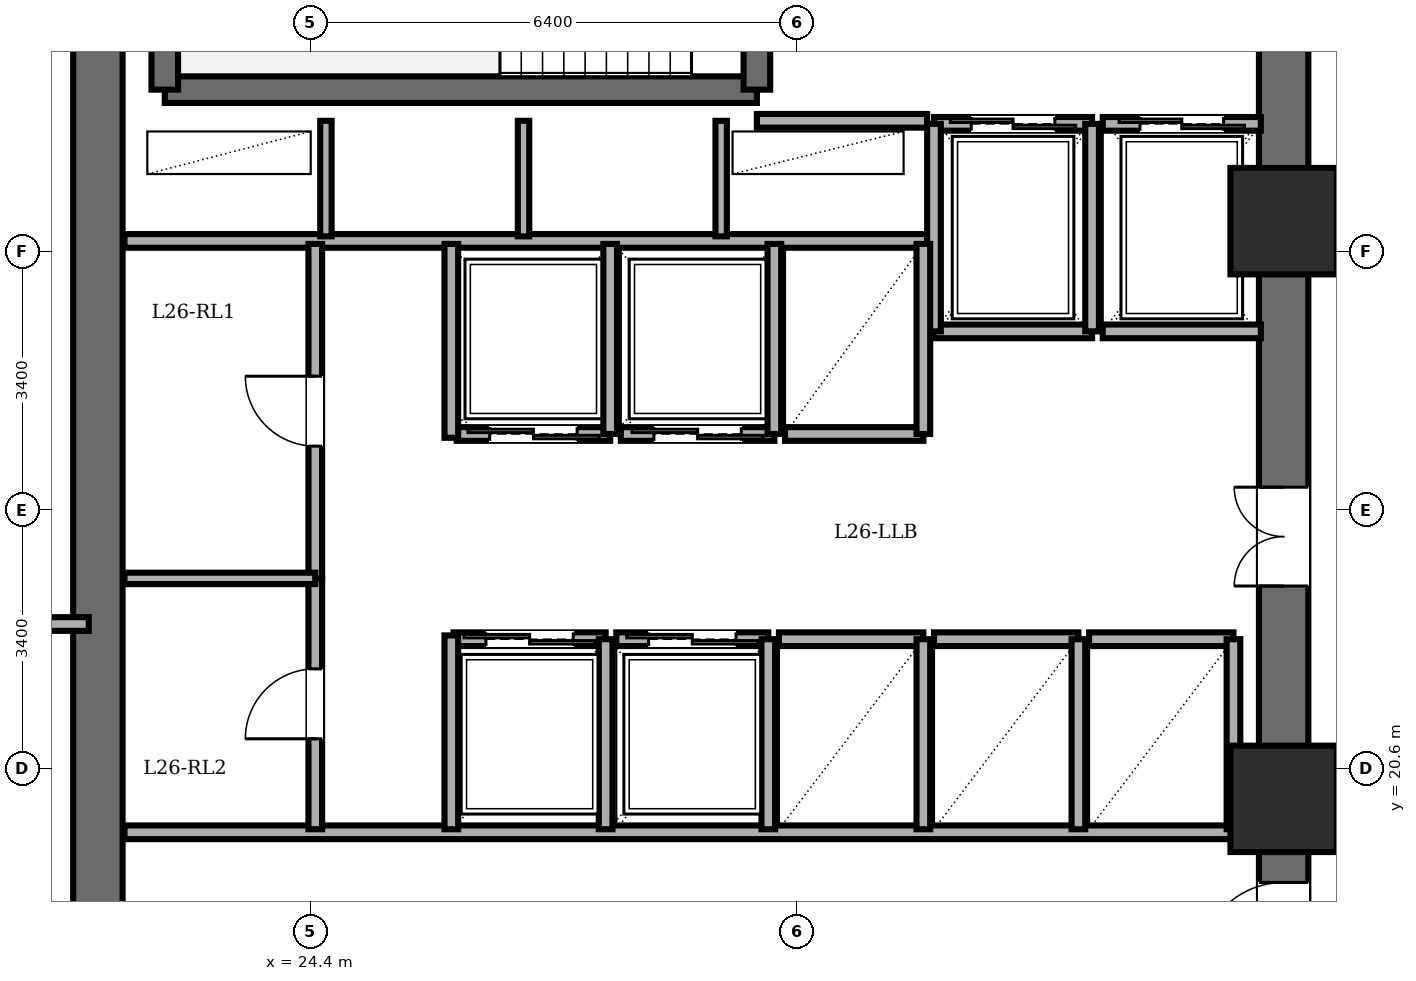
"""IFC4 building model, lengths in metres.
Left out: names, types, materials, properties, quantities, classifications, styles, units other than length and angle.
Written with IfcOpenShell. Run it as: python <this file> out.ifc"""

import sys

from ifc_helpers import new_model, si_unit, direction, frame, frame_2d, origin, origin_2d, place, context, subcontext, project, spatial, rectangle, extrude, element, fill, save


model = new_model("IFC4")
c1 = context("Model", 3, precision=1e-05, world=origin(), true_north=direction((0.0, 1.0)))
c2 = subcontext(c1, "Body", "Model", "MODEL_VIEW")
j1 = project(units=[si_unit("LENGTHUNIT", "METRE"), si_unit("PLANEANGLEUNIT", "RADIAN")], contexts=[c1])
p1 = place(None, origin())
s1 = spatial("IfcSite", under=j1, at=p1, CompositionType="ELEMENT")
p2 = place(p1, origin())
s2 = spatial("IfcBuilding", under=s1, at=p2, CompositionType="ELEMENT")
p3 = place(p2, frame((0.0, 0.0, 100.7)))
s3 = spatial("IfcBuildingStorey", under=s2, at=p3, CompositionType="ELEMENT", Elevation=100.7)
for number, where, z_axis, x_axis in (
    (1, (37.2, 20.2, 0.0), (0.0, 0.0, 1.0), (1.0, 0.0, 0.0)),
    (2, (37.2, 27.8, 0.0), (0.0, 0.0, 1.0), (1.0, 0.0, 0.0)),
):
    element("IfcColumn", number, at=place(p3, frame(where, z_axis=z_axis, x_axis=x_axis)), inside=s3, PredefinedType="COLUMN", context=c2, shape_type="SweptSolid", body=[
        extrude(rectangle(XDim=1.4, YDim=1.4, at=origin_2d()), origin(), (0.0, 0.0, 1.0), 3.6),
    ])
p4 = place(p3, frame((21.6, 14.4, 0.0), z_axis=(0.0, 0.0, 1.0), x_axis=(0.0, 1.0, 0.0)))
e3 = element("IfcWall", 3, at=p4, inside=s3, PredefinedType="SHEAR", context=c2, shape_type="SweptSolid", body=[
    extrude(rectangle(XDim=19.2, YDim=0.65, at=frame_2d((9.6, 0.0))), origin(), (0.0, 0.0, 1.0), 3.4),
])
p5 = place(p3, frame((37.2, 14.4, 0.0), z_axis=(0.0, 0.0, 1.0), x_axis=(0.0, 1.0, 0.0)))
e4 = element("IfcWall", 4, at=p5, inside=s3, PredefinedType="SHEAR", context=c2, shape_type="SweptSolid", body=[
    extrude(rectangle(XDim=19.2, YDim=0.65, at=frame_2d((9.6, 0.0))), origin(), (0.0, 0.0, 1.0), 3.4),
])
p6 = place(p5, frame((15.8, 0.0, 0.0)))
e5 = element("IfcOpeningElement", 5, at=p6, cuts=e4, PredefinedType="OPENING", context=c2, shape_type="SweptSolid", body=[
    extrude(rectangle(XDim=1.15, YDim=2.15, at=frame_2d((0.575, 1.075))), frame((0.0, 0.335, 0.0), z_axis=(0.0, -1.0, 0.0), x_axis=(1.0, 0.0, 0.0)), (0.0, 0.0, 1.0), 0.67),
])
p7 = place(p5, frame((3.6, 0.0, 0.0)))
e6 = element("IfcOpeningElement", 6, at=p7, cuts=e4, PredefinedType="OPENING", context=c2, shape_type="SweptSolid", body=[
    extrude(rectangle(XDim=1.1, YDim=2.15, at=frame_2d((0.55, 1.075))), frame((0.0, 0.335, 0.0), z_axis=(0.0, -1.0, 0.0), x_axis=(1.0, 0.0, 0.0)), (0.0, 0.0, 1.0), 0.67),
])
p8 = place(p5, frame((8.6, 0.0, 0.0)))
e7 = element("IfcOpeningElement", 7, at=p8, cuts=e4, PredefinedType="OPENING", context=c2, shape_type="SweptSolid", body=[
    extrude(rectangle(XDim=1.3, YDim=2.2, at=frame_2d((0.65, 1.1))), frame((0.0, 0.335, 0.0), z_axis=(0.0, -1.0, 0.0), x_axis=(1.0, 0.0, 0.0)), (0.0, 0.0, 1.0), 0.67),
])
p9 = place(p3, frame((22.48, 29.53, 0.0), z_axis=(0.0, 0.0, 1.0), x_axis=(1.0, 0.0, 0.0)))
e8 = element("IfcWall", 8, at=p9, inside=s3, PredefinedType="SOLIDWALL", context=c2, shape_type="SweptSolid", body=[
    extrude(rectangle(XDim=7.79, YDim=0.35, at=frame_2d((3.895, 0.0))), origin(), (0.0, 0.0, 1.0), 3.4),
])
p10 = place(p3, frame((22.48, 29.53, 0.0), z_axis=(0.0, 0.0, 1.0), x_axis=(0.0, 1.0, 0.0)))
e9 = element("IfcWall", 9, at=p10, inside=s3, PredefinedType="SOLIDWALL", context=c2, shape_type="SweptSolid", body=[
    extrude(rectangle(XDim=3.58, YDim=0.35, at=frame_2d((1.79, 0.0))), origin(), (0.0, 0.0, 1.0), 3.4),
])
p11 = place(p3, frame((30.27, 29.53, 0.0), z_axis=(0.0, 0.0, 1.0), x_axis=(0.0, 1.0, 0.0)))
e10 = element("IfcWall", 10, at=p11, inside=s3, PredefinedType="SOLIDWALL", context=c2, shape_type="SweptSolid", body=[
    extrude(rectangle(XDim=3.58, YDim=0.35, at=frame_2d((1.79, 0.0))), origin(), (0.0, 0.0, 1.0), 3.4),
])
p12 = place(p11, frame((1.25, 0.0, 0.0)))
e11 = element("IfcOpeningElement", 11, at=p12, cuts=e10, PredefinedType="OPENING", context=c2, shape_type="SweptSolid", body=[
    extrude(rectangle(XDim=1.1, YDim=2.15, at=frame_2d((0.55, 1.075))), frame((0.0, 0.185, 0.0), z_axis=(0.0, -1.0, 0.0), x_axis=(1.0, 0.0, 0.0)), (0.0, 0.0, 1.0), 0.37),
])
p13 = place(p3, frame((30.27, 29.12, 0.0), z_axis=(0.0, 0.0, 1.0), x_axis=(1.0, 0.0, 0.0)))
e12 = element("IfcWall", 12, at=p13, inside=s3, PredefinedType="PARTITIONING", context=c2, shape_type="SweptSolid", body=[
    extrude(rectangle(XDim=2.24, YDim=0.18, at=frame_2d((1.12, 0.0))), origin(), (0.0, 0.0, 1.0), 3.4),
])
p14 = place(p3, frame((21.95, 27.54, 0.0), z_axis=(0.0, 0.0, 1.0), x_axis=(1.0, 0.0, 0.0)))
e13 = element("IfcWall", 13, at=p14, inside=s3, PredefinedType="PARTITIONING", context=c2, shape_type="SweptSolid", body=[
    extrude(rectangle(XDim=10.56, YDim=0.18, at=frame_2d((5.28, 0.0))), origin(), (0.0, 0.0, 1.0), 3.4),
])
for number, where, z_axis, x_axis in (
    (14, (24.6, 27.6, 0.0), (0.0, 0.0, 1.0), (0.0, 1.0, 0.0)),
    (15, (27.2, 27.6, 0.0), (0.0, 0.0, 1.0), (0.0, 1.0, 0.0)),
    (16, (29.8, 27.6, 0.0), (0.0, 0.0, 1.0), (0.0, 1.0, 0.0)),
):
    element("IfcWall", number, at=place(p3, frame(where, z_axis=z_axis, x_axis=x_axis)), inside=s3, PredefinedType="PARTITIONING", context=c2, shape_type="SweptSolid", body=[
        extrude(rectangle(XDim=1.52, YDim=0.15, at=frame_2d((0.76, 0.0))), origin(), (0.0, 0.0, 1.0), 3.4),
    ])
p15 = place(p3, frame((21.95, 19.76, 0.0), z_axis=(0.0, 0.0, 1.0), x_axis=(1.0, 0.0, 0.0)))
e17 = element("IfcWall", 17, at=p15, inside=s3, PredefinedType="PARTITIONING", context=c2, shape_type="SweptSolid", body=[
    extrude(rectangle(XDim=14.87, YDim=0.18, at=frame_2d((7.435, 0.0))), origin(), (0.0, 0.0, 1.0), 3.4),
])
p16 = place(p3, frame((32.6, 29.08, 0.0), z_axis=(0.0, 0.0, 1.0), x_axis=(1.0, 0.0, 0.0)))
e18 = element("IfcWall", 18, at=p16, inside=s3, PredefinedType="PARTITIONING", context=c2, shape_type="SweptSolid", body=[
    extrude(rectangle(XDim=2.08, YDim=0.18, at=frame_2d((1.04, 0.0))), origin(), (0.0, 0.0, 1.0), 3.4),
])
p17 = place(p16, frame((0.49, 0.0, 0.0)))
e19 = element("IfcOpeningElement", 19, at=p17, cuts=e18, PredefinedType="OPENING", context=c2, shape_type="SweptSolid", body=[
    extrude(rectangle(XDim=1.1, YDim=2.2, at=frame_2d((0.55, 1.1))), frame((0.0, 0.1, 0.0), z_axis=(0.0, -1.0, 0.0), x_axis=(1.0, 0.0, 0.0)), (0.0, 0.0, 1.0), 0.2),
])
p18 = place(p3, frame((34.68, 26.35, 0.0), z_axis=(0.0, 0.0, 1.0), x_axis=(-1.0, 0.0, 0.0)))
e20 = element("IfcWall", 20, at=p18, inside=s3, PredefinedType="PARTITIONING", context=c2, shape_type="SweptSolid", body=[
    extrude(rectangle(XDim=2.08, YDim=0.18, at=frame_2d((1.04, 0.0))), origin(), (0.0, 0.0, 1.0), 3.4),
])
for number, where, z_axis, x_axis in (
    (21, (34.68, 26.35, 0.0), (0.0, 0.0, 1.0), (0.0, 1.0, 0.0)),
    (22, (32.6, 29.08, 0.0), (0.0, 0.0, 1.0), (0.0, -1.0, 0.0)),
):
    element("IfcWall", number, at=place(p3, frame(where, z_axis=z_axis, x_axis=x_axis)), inside=s3, PredefinedType="PARTITIONING", context=c2, shape_type="SweptSolid", body=[
        extrude(rectangle(XDim=2.73, YDim=0.18, at=frame_2d((1.365, 0.0))), origin(), (0.0, 0.0, 1.0), 3.4),
    ])
p19 = place(p3, frame((34.82, 29.08, 0.0), z_axis=(0.0, 0.0, 1.0), x_axis=(1.0, 0.0, 0.0)))
e23 = element("IfcWall", 23, at=p19, inside=s3, PredefinedType="PARTITIONING", context=c2, shape_type="SweptSolid", body=[
    extrude(rectangle(XDim=2.08, YDim=0.18, at=frame_2d((1.04, 0.0))), origin(), (0.0, 0.0, 1.0), 3.4),
])
p20 = place(p19, frame((0.49, 0.0, 0.0)))
e24 = element("IfcOpeningElement", 24, at=p20, cuts=e23, PredefinedType="OPENING", context=c2, shape_type="SweptSolid", body=[
    extrude(rectangle(XDim=1.1, YDim=2.2, at=frame_2d((0.55, 1.1))), frame((0.0, 0.1, 0.0), z_axis=(0.0, -1.0, 0.0), x_axis=(1.0, 0.0, 0.0)), (0.0, 0.0, 1.0), 0.2),
])
p21 = place(p3, frame((36.9, 26.35, 0.0), z_axis=(0.0, 0.0, 1.0), x_axis=(-1.0, 0.0, 0.0)))
e25 = element("IfcWall", 25, at=p21, inside=s3, PredefinedType="PARTITIONING", context=c2, shape_type="SweptSolid", body=[
    extrude(rectangle(XDim=2.08, YDim=0.18, at=frame_2d((1.04, 0.0))), origin(), (0.0, 0.0, 1.0), 3.4),
])
p22 = place(p3, frame((28.34, 25.0, 0.0), z_axis=(0.0, 0.0, 1.0), x_axis=(-1.0, 0.0, 0.0)))
e26 = element("IfcWall", 26, at=p22, inside=s3, PredefinedType="PARTITIONING", context=c2, shape_type="SweptSolid", body=[
    extrude(rectangle(XDim=2.02, YDim=0.18, at=frame_2d((1.01, 0.0))), origin(), (0.0, 0.0, 1.0), 3.4),
])
p23 = place(p22, frame((0.435, 0.0, 0.0)))
e27 = element("IfcOpeningElement", 27, at=p23, cuts=e26, PredefinedType="OPENING", context=c2, shape_type="SweptSolid", body=[
    extrude(rectangle(XDim=1.15, YDim=2.2, at=frame_2d((0.575, 1.1))), frame((0.0, 0.1, 0.0), z_axis=(0.0, -1.0, 0.0), x_axis=(1.0, 0.0, 0.0)), (0.0, 0.0, 1.0), 0.2),
])
p24 = place(p3, frame((28.34, 25.0, 0.0), z_axis=(0.0, 0.0, 1.0), x_axis=(0.0, 1.0, 0.0)))
e28 = element("IfcWall", 28, at=p24, inside=s3, PredefinedType="PARTITIONING", context=c2, shape_type="SweptSolid", body=[
    extrude(rectangle(XDim=2.5, YDim=0.18, at=frame_2d((1.25, 0.0))), origin(), (0.0, 0.0, 1.0), 3.4),
])
p25 = place(p3, frame((30.5, 25.0, 0.0), z_axis=(0.0, 0.0, 1.0), x_axis=(-1.0, 0.0, 0.0)))
e29 = element("IfcWall", 29, at=p25, inside=s3, PredefinedType="PARTITIONING", context=c2, shape_type="SweptSolid", body=[
    extrude(rectangle(XDim=2.02, YDim=0.18, at=frame_2d((1.01, 0.0))), origin(), (0.0, 0.0, 1.0), 3.4),
])
p26 = place(p25, frame((0.435, 0.0, 0.0)))
e30 = element("IfcOpeningElement", 30, at=p26, cuts=e29, PredefinedType="OPENING", context=c2, shape_type="SweptSolid", body=[
    extrude(rectangle(XDim=1.15, YDim=2.2, at=frame_2d((0.575, 1.1))), frame((0.0, 0.1, 0.0), z_axis=(0.0, -1.0, 0.0), x_axis=(1.0, 0.0, 0.0)), (0.0, 0.0, 1.0), 0.2),
])
p27 = place(p3, frame((30.5, 25.0, 0.0), z_axis=(0.0, 0.0, 1.0), x_axis=(0.0, 1.0, 0.0)))
e31 = element("IfcWall", 31, at=p27, inside=s3, PredefinedType="PARTITIONING", context=c2, shape_type="SweptSolid", body=[
    extrude(rectangle(XDim=2.5, YDim=0.18, at=frame_2d((1.25, 0.0))), origin(), (0.0, 0.0, 1.0), 3.4),
])
p28 = place(p3, frame((26.28, 22.3, 0.0), z_axis=(0.0, 0.0, 1.0), x_axis=(1.0, 0.0, 0.0)))
e32 = element("IfcWall", 32, at=p28, inside=s3, PredefinedType="PARTITIONING", context=c2, shape_type="SweptSolid", body=[
    extrude(rectangle(XDim=2.0, YDim=0.18, at=frame_2d((1.0, 0.0))), origin(), (0.0, 0.0, 1.0), 3.4),
])
p29 = place(p28, frame((0.425, 0.0, 0.0)))
e33 = element("IfcOpeningElement", 33, at=p29, cuts=e32, PredefinedType="OPENING", context=c2, shape_type="SweptSolid", body=[
    extrude(rectangle(XDim=1.15, YDim=2.2, at=frame_2d((0.575, 1.1))), frame((0.0, 0.1, 0.0), z_axis=(0.0, -1.0, 0.0), x_axis=(1.0, 0.0, 0.0)), (0.0, 0.0, 1.0), 0.2),
])
p30 = place(p3, frame((28.28, 19.8, 0.0), z_axis=(0.0, 0.0, 1.0), x_axis=(0.0, 1.0, 0.0)))
e34 = element("IfcWall", 34, at=p30, inside=s3, PredefinedType="PARTITIONING", context=c2, shape_type="SweptSolid", body=[
    extrude(rectangle(XDim=2.5, YDim=0.18, at=frame_2d((1.25, 0.0))), origin(), (0.0, 0.0, 1.0), 3.4),
])
p31 = place(p3, frame((28.42, 22.3, 0.0), z_axis=(0.0, 0.0, 1.0), x_axis=(1.0, 0.0, 0.0)))
e35 = element("IfcWall", 35, at=p31, inside=s3, PredefinedType="PARTITIONING", context=c2, shape_type="SweptSolid", body=[
    extrude(rectangle(XDim=2.0, YDim=0.18, at=frame_2d((1.0, 0.0))), origin(), (0.0, 0.0, 1.0), 3.4),
])
p32 = place(p31, frame((0.425, 0.0, 0.0)))
e36 = element("IfcOpeningElement", 36, at=p32, cuts=e35, PredefinedType="OPENING", context=c2, shape_type="SweptSolid", body=[
    extrude(rectangle(XDim=1.15, YDim=2.2, at=frame_2d((0.575, 1.1))), frame((0.0, 0.1, 0.0), z_axis=(0.0, -1.0, 0.0), x_axis=(1.0, 0.0, 0.0)), (0.0, 0.0, 1.0), 0.2),
])
p33 = place(p3, frame((30.42, 19.8, 0.0), z_axis=(0.0, 0.0, 1.0), x_axis=(0.0, 1.0, 0.0)))
e37 = element("IfcWall", 37, at=p33, inside=s3, PredefinedType="PARTITIONING", context=c2, shape_type="SweptSolid", body=[
    extrude(rectangle(XDim=2.5, YDim=0.18, at=frame_2d((1.25, 0.0))), origin(), (0.0, 0.0, 1.0), 3.4),
])
p34 = place(p3, frame((32.46, 25.0, 0.0), z_axis=(0.0, 0.0, 1.0), x_axis=(-1.0, 0.0, 0.0)))
e38 = element("IfcWall", 38, at=p34, inside=s3, PredefinedType="PARTITIONING", context=c2, shape_type="SweptSolid", body=[
    extrude(rectangle(XDim=1.82, YDim=0.18, at=frame_2d((0.91, 0.0))), origin(), (0.0, 0.0, 1.0), 3.4),
])
p35 = place(p3, frame((32.46, 25.0, 0.0), z_axis=(0.0, 0.0, 1.0), x_axis=(0.0, 1.0, 0.0)))
e39 = element("IfcWall", 39, at=p35, inside=s3, PredefinedType="PARTITIONING", context=c2, shape_type="SweptSolid", body=[
    extrude(rectangle(XDim=2.5, YDim=0.18, at=frame_2d((1.25, 0.0))), origin(), (0.0, 0.0, 1.0), 3.4),
])
p36 = place(p3, frame((30.56, 22.3, 0.0), z_axis=(0.0, 0.0, 1.0), x_axis=(1.0, 0.0, 0.0)))
e40 = element("IfcWall", 40, at=p36, inside=s3, PredefinedType="PARTITIONING", context=c2, shape_type="SweptSolid", body=[
    extrude(rectangle(XDim=1.9, YDim=0.18, at=frame_2d((0.95, 0.0))), origin(), (0.0, 0.0, 1.0), 3.4),
])
p37 = place(p3, frame((32.46, 19.8, 0.0), z_axis=(0.0, 0.0, 1.0), x_axis=(0.0, 1.0, 0.0)))
e41 = element("IfcWall", 41, at=p37, inside=s3, PredefinedType="PARTITIONING", context=c2, shape_type="SweptSolid", body=[
    extrude(rectangle(XDim=2.5, YDim=0.18, at=frame_2d((1.25, 0.0))), origin(), (0.0, 0.0, 1.0), 3.4),
])
p38 = place(p3, frame((32.6, 22.3, 0.0), z_axis=(0.0, 0.0, 1.0), x_axis=(1.0, 0.0, 0.0)))
e42 = element("IfcWall", 42, at=p38, inside=s3, PredefinedType="PARTITIONING", context=c2, shape_type="SweptSolid", body=[
    extrude(rectangle(XDim=1.9, YDim=0.18, at=frame_2d((0.95, 0.0))), origin(), (0.0, 0.0, 1.0), 3.4),
])
p39 = place(p3, frame((34.5, 19.8, 0.0), z_axis=(0.0, 0.0, 1.0), x_axis=(0.0, 1.0, 0.0)))
e43 = element("IfcWall", 43, at=p39, inside=s3, PredefinedType="PARTITIONING", context=c2, shape_type="SweptSolid", body=[
    extrude(rectangle(XDim=2.5, YDim=0.18, at=frame_2d((1.25, 0.0))), origin(), (0.0, 0.0, 1.0), 3.4),
])
p40 = place(p3, frame((34.64, 22.3, 0.0), z_axis=(0.0, 0.0, 1.0), x_axis=(1.0, 0.0, 0.0)))
e44 = element("IfcWall", 44, at=p40, inside=s3, PredefinedType="PARTITIONING", context=c2, shape_type="SweptSolid", body=[
    extrude(rectangle(XDim=1.9, YDim=0.18, at=frame_2d((0.95, 0.0))), origin(), (0.0, 0.0, 1.0), 3.4),
])
p41 = place(p3, frame((36.54, 19.8, 0.0), z_axis=(0.0, 0.0, 1.0), x_axis=(0.0, 1.0, 0.0)))
e45 = element("IfcWall", 45, at=p41, inside=s3, PredefinedType="PARTITIONING", context=c2, shape_type="SweptSolid", body=[
    extrude(rectangle(XDim=2.5, YDim=0.18, at=frame_2d((1.25, 0.0))), origin(), (0.0, 0.0, 1.0), 3.4),
])
p42 = place(p3, frame((24.46, 23.1, 0.0), z_axis=(0.0, 0.0, 1.0), x_axis=(0.0, 1.0, 0.0)))
e46 = element("IfcWall", 46, at=p42, inside=s3, PredefinedType="PARTITIONING", context=c2, shape_type="SweptSolid", body=[
    extrude(rectangle(XDim=4.4, YDim=0.18, at=frame_2d((2.2, 0.0))), origin(), (0.0, 0.0, 1.0), 3.4),
])
p43 = place(p42, frame((1.74, 0.0, 0.0)))
e47 = element("IfcOpeningElement", 47, at=p43, cuts=e46, PredefinedType="OPENING", context=c2, shape_type="SweptSolid", body=[
    extrude(rectangle(XDim=0.92, YDim=2.1, at=frame_2d((0.46, 1.05))), frame((0.0, 0.1, 0.0), z_axis=(0.0, -1.0, 0.0), x_axis=(1.0, 0.0, 0.0)), (0.0, 0.0, 1.0), 0.2),
])
p44 = place(p3, frame((24.46, 19.8, 0.0), z_axis=(0.0, 0.0, 1.0), x_axis=(0.0, 1.0, 0.0)))
e48 = element("IfcWall", 48, at=p44, inside=s3, PredefinedType="PARTITIONING", context=c2, shape_type="SweptSolid", body=[
    extrude(rectangle(XDim=3.3, YDim=0.18, at=frame_2d((1.65, 0.0))), origin(), (0.0, 0.0, 1.0), 3.4),
])
p45 = place(p44, frame((1.19, 0.0, 0.0)))
e49 = element("IfcOpeningElement", 49, at=p45, cuts=e48, PredefinedType="OPENING", context=c2, shape_type="SweptSolid", body=[
    extrude(rectangle(XDim=0.92, YDim=2.1, at=frame_2d((0.46, 1.05))), frame((0.0, 0.1, 0.0), z_axis=(0.0, -1.0, 0.0), x_axis=(1.0, 0.0, 0.0)), (0.0, 0.0, 1.0), 0.2),
])
p46 = place(p3, frame((21.95, 23.1, 0.0), z_axis=(0.0, 0.0, 1.0), x_axis=(1.0, 0.0, 0.0)))
e50 = element("IfcWall", 50, at=p46, inside=s3, PredefinedType="PARTITIONING", context=c2, shape_type="SweptSolid", body=[
    extrude(rectangle(XDim=2.51, YDim=0.15, at=frame_2d((1.255, 0.0))), origin(), (0.0, 0.0, 1.0), 3.4),
])
for number, where, z_axis, x_axis in (
    (51, (26.25, 24.95, 0.0), (0.0, 0.0, 1.0), (0.0, 1.0, 0.0)),
    (52, (26.25, 19.8, 0.0), (0.0, 0.0, 1.0), (0.0, 1.0, 0.0)),
):
    element("IfcWall", number, at=place(p3, frame(where, z_axis=z_axis, x_axis=x_axis)), inside=s3, PredefinedType="PARTITIONING", context=c2, shape_type="SweptSolid", body=[
        extrude(rectangle(XDim=2.55, YDim=0.18, at=frame_2d((1.275, 0.0))), origin(), (0.0, 0.0, 1.0), 3.4),
    ])
p47 = place(p3, frame((8.8, 22.5, 0.0), z_axis=(0.0, 0.0, 1.0), x_axis=(1.0, 0.0, 0.0)))
e53 = element("IfcWall", 53, at=p47, inside=s3, PredefinedType="PARTITIONING", context=c2, shape_type="SweptSolid", body=[
    extrude(rectangle(XDim=12.68, YDim=0.18, at=frame_2d((6.34, 0.0))), origin(), (0.0, 0.0, 1.0), 3.4),
])
p48 = place(p7, origin())
e54 = element("IfcDoor", 54, at=p48, inside=s3, OperationType="SINGLE_SWING_LEFT", PredefinedType="DOOR", context=c2, shape_type="SweptSolid", body=[
    extrude(rectangle(XDim=1.1, YDim=2.15, at=frame_2d((0.55, 1.075))), frame((0.0, 0.025, 0.0), z_axis=(0.0, -1.0, 0.0), x_axis=(1.0, 0.0, 0.0)), (0.0, 0.0, 1.0), 0.05),
])
fill(e6, e54)
p49 = place(p17, origin())
e55 = element("IfcDoor", 55, at=p49, inside=s3, OperationType="DOUBLE_DOOR_SLIDING", PredefinedType="DOOR", context=c2, shape_type="SweptSolid", body=[
    extrude(rectangle(XDim=1.1, YDim=2.2, at=frame_2d((0.55, 1.1))), frame((0.0, 0.025, 0.0), z_axis=(0.0, -1.0, 0.0), x_axis=(1.0, 0.0, 0.0)), (0.0, 0.0, 1.0), 0.05),
])
fill(e19, e55)
p50 = place(p20, origin())
e56 = element("IfcDoor", 56, at=p50, inside=s3, OperationType="DOUBLE_DOOR_SLIDING", PredefinedType="DOOR", context=c2, shape_type="SweptSolid", body=[
    extrude(rectangle(XDim=1.1, YDim=2.2, at=frame_2d((0.55, 1.1))), frame((0.0, 0.025, 0.0), z_axis=(0.0, -1.0, 0.0), x_axis=(1.0, 0.0, 0.0)), (0.0, 0.0, 1.0), 0.05),
])
fill(e24, e56)
p51 = place(p23, origin())
e57 = element("IfcDoor", 57, at=p51, inside=s3, OperationType="DOUBLE_DOOR_SLIDING", PredefinedType="DOOR", context=c2, shape_type="SweptSolid", body=[
    extrude(rectangle(XDim=1.15, YDim=2.2, at=frame_2d((0.575, 1.1))), frame((0.0, 0.025, 0.0), z_axis=(0.0, -1.0, 0.0), x_axis=(1.0, 0.0, 0.0)), (0.0, 0.0, 1.0), 0.05),
])
fill(e27, e57)
p52 = place(p26, origin())
e58 = element("IfcDoor", 58, at=p52, inside=s3, OperationType="DOUBLE_DOOR_SLIDING", PredefinedType="DOOR", context=c2, shape_type="SweptSolid", body=[
    extrude(rectangle(XDim=1.15, YDim=2.2, at=frame_2d((0.575, 1.1))), frame((0.0, 0.025, 0.0), z_axis=(0.0, -1.0, 0.0), x_axis=(1.0, 0.0, 0.0)), (0.0, 0.0, 1.0), 0.05),
])
fill(e30, e58)
p53 = place(p29, origin())
e59 = element("IfcDoor", 59, at=p53, inside=s3, OperationType="DOUBLE_DOOR_SLIDING", PredefinedType="DOOR", context=c2, shape_type="SweptSolid", body=[
    extrude(rectangle(XDim=1.15, YDim=2.2, at=frame_2d((0.575, 1.1))), frame((0.0, 0.025, 0.0), z_axis=(0.0, -1.0, 0.0), x_axis=(1.0, 0.0, 0.0)), (0.0, 0.0, 1.0), 0.05),
])
fill(e33, e59)
p54 = place(p32, origin())
e60 = element("IfcDoor", 60, at=p54, inside=s3, OperationType="DOUBLE_DOOR_SLIDING", PredefinedType="DOOR", context=c2, shape_type="SweptSolid", body=[
    extrude(rectangle(XDim=1.15, YDim=2.2, at=frame_2d((0.575, 1.1))), frame((0.0, 0.025, 0.0), z_axis=(0.0, -1.0, 0.0), x_axis=(1.0, 0.0, 0.0)), (0.0, 0.0, 1.0), 0.05),
])
fill(e36, e60)
p55 = place(p43, origin())
e61 = element("IfcDoor", 61, at=p55, inside=s3, OperationType="SINGLE_SWING_RIGHT", PredefinedType="DOOR", context=c2, shape_type="SweptSolid", body=[
    extrude(rectangle(XDim=0.92, YDim=2.1, at=frame_2d((0.46, 1.05))), frame((0.0, 0.025, 0.0), z_axis=(0.0, -1.0, 0.0), x_axis=(1.0, 0.0, 0.0)), (0.0, 0.0, 1.0), 0.05),
])
fill(e47, e61)
p56 = place(p45, origin())
e62 = element("IfcDoor", 62, at=p56, inside=s3, OperationType="SINGLE_SWING_LEFT", PredefinedType="DOOR", context=c2, shape_type="SweptSolid", body=[
    extrude(rectangle(XDim=0.92, YDim=2.1, at=frame_2d((0.46, 1.05))), frame((0.0, 0.025, 0.0), z_axis=(0.0, -1.0, 0.0), x_axis=(1.0, 0.0, 0.0)), (0.0, 0.0, 1.0), 0.05),
])
fill(e49, e62)
p57 = place(p8, origin())
e63 = element("IfcDoor", 63, at=p57, inside=s3, OperationType="DOUBLE_DOOR_SINGLE_SWING", PredefinedType="DOOR", context=c2, shape_type="SweptSolid", body=[
    extrude(rectangle(XDim=1.3, YDim=2.2, at=frame_2d((0.65, 1.1))), frame((0.0, 0.025, 0.0), z_axis=(0.0, -1.0, 0.0), x_axis=(1.0, 0.0, 0.0)), (0.0, 0.0, 1.0), 0.05),
])
fill(e7, e63)
save(model, sys.argv[1])
